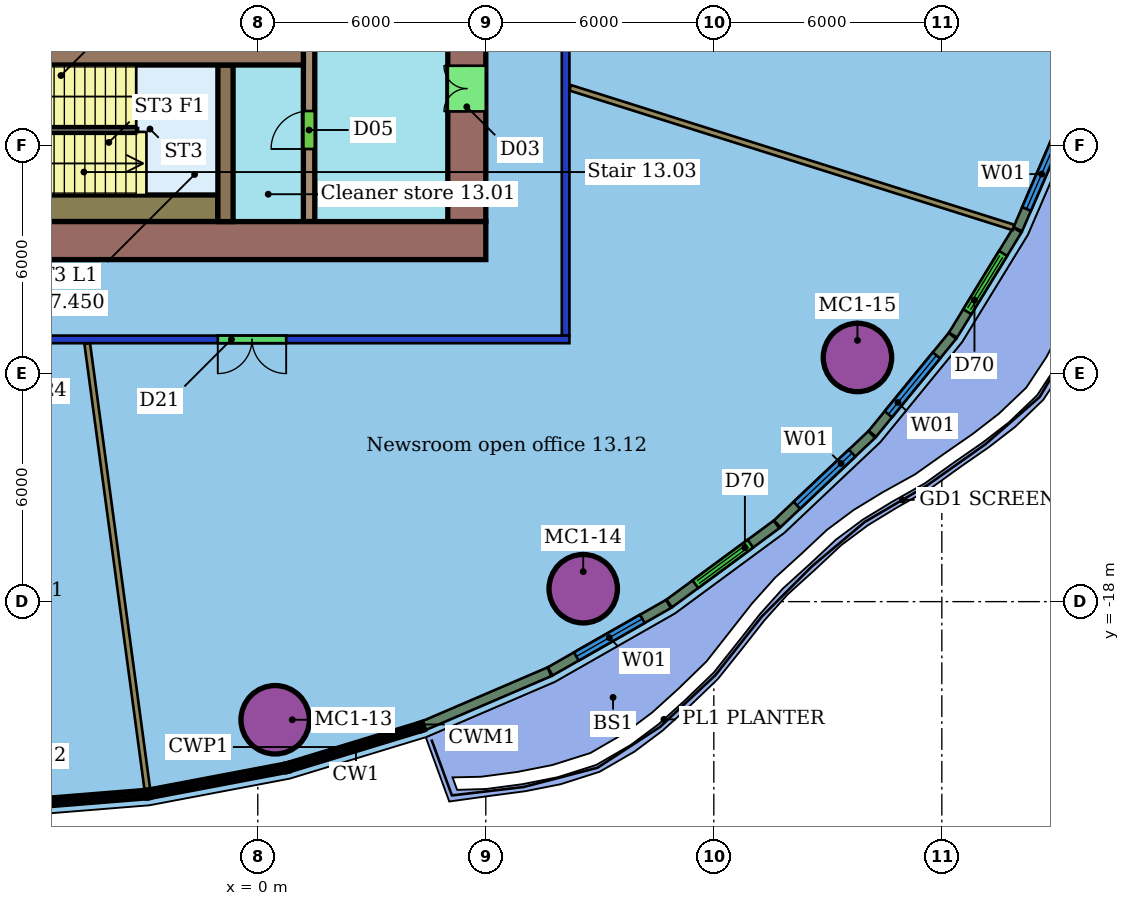
"""IFC4 building model, lengths in metres.
Left out: names, types, materials, properties, quantities, classifications, styles, units other than length and angle.
Written with IfcOpenShell. Run it as: python <this file> out.ifc"""

import sys

from ifc_helpers import new_model, si_unit, direction, frame, frame_2d, origin, origin_2d, place, context, subcontext, project, spatial, rectangle, hollow_circle, extrude, element, fill, save


model = new_model("IFC4")
c1 = context("Model", 3, precision=1e-05, world=origin(), true_north=direction((0.0, 1.0)))
c2 = subcontext(c1, "Body", "Model", "MODEL_VIEW")
j1 = project(units=[si_unit("LENGTHUNIT", "METRE"), si_unit("PLANEANGLEUNIT", "RADIAN")], contexts=[c1])
p1 = place(None, origin())
s1 = spatial("IfcSite", under=j1, at=p1, CompositionType="ELEMENT")
p2 = place(p1, origin())
s2 = spatial("IfcBuilding", under=s1, at=p2, CompositionType="ELEMENT")
p3 = place(p2, frame((0.0, 0.0, 65.6)))
s3 = spatial("IfcBuildingStorey", under=s2, at=p3, CompositionType="ELEMENT", Elevation=65.6)
for number, where, z_axis, x_axis in (
    (1, (0.458, -21.108, 0.0), (0.0, 0.0, 1.0), (1.0, 0.0, 0.0)),
    (2, (8.563, -17.66, 0.0), (0.0, 0.0, 1.0), (1.0, 0.0, 0.0)),
    (3, (15.78, -11.576, 0.0), (0.0, 0.0, 1.0), (1.0, 0.0, 0.0)),
):
    element("IfcColumn", number, at=place(p3, frame(where, z_axis=z_axis, x_axis=x_axis)), inside=s3, PredefinedType="COLUMN", context=c2, shape_type="SweptSolid", body=[
        extrude(hollow_circle(Radius=0.9, WallThickness=0.06, at=origin_2d()), origin(), (0.0, 0.0, 1.0), 3.55),
    ])
p4 = place(p3, frame((8.2, -11.1, 0.0), z_axis=(0.0, 0.0, 1.0), x_axis=(-1.0, 0.0, 0.0)))
e4 = element("IfcWall", 4, at=p4, inside=s3, PredefinedType="PARTITIONING", context=c2, shape_type="SweptSolid", body=[
    extrude(rectangle(XDim=28.4, YDim=0.2, at=frame_2d((14.2, 0.0))), origin(), (0.0, 0.0, 1.0), 2.85),
])
p5 = place(p4, frame((19.964, 0.0, 0.0)))
e5 = element("IfcOpeningElement", 5, at=p5, cuts=e4, PredefinedType="OPENING", context=c2, shape_type="SweptSolid", body=[
    extrude(rectangle(XDim=1.1, YDim=2.1, at=frame_2d((0.55, 1.05))), frame((0.0, 0.11, 0.0), z_axis=(0.0, -1.0, 0.0), x_axis=(1.0, 0.0, 0.0)), (0.0, 0.0, 1.0), 0.22),
])
p6 = place(p4, frame((15.239, 0.0, 0.0)))
e6 = element("IfcOpeningElement", 6, at=p6, cuts=e4, PredefinedType="OPENING", context=c2, shape_type="SweptSolid", body=[
    extrude(rectangle(XDim=1.5, YDim=2.1, at=frame_2d((0.75, 1.05))), frame((0.0, 0.11, 0.0), z_axis=(0.0, -1.0, 0.0), x_axis=(1.0, 0.0, 0.0)), (0.0, 0.0, 1.0), 0.22),
])
p7 = place(p4, frame((7.453, 0.0, 0.0)))
e7 = element("IfcOpeningElement", 7, at=p7, cuts=e4, PredefinedType="OPENING", context=c2, shape_type="SweptSolid", body=[
    extrude(rectangle(XDim=1.8, YDim=2.1, at=frame_2d((0.9, 1.05))), frame((0.0, 0.11, 0.0), z_axis=(0.0, -1.0, 0.0), x_axis=(1.0, 0.0, 0.0)), (0.0, 0.0, 1.0), 0.22),
])
p8 = place(p3, frame((8.1, 11.0, 0.0), z_axis=(0.0, 0.0, 1.0), x_axis=(0.0, -1.0, 0.0)))
e8 = element("IfcWall", 8, at=p8, inside=s3, PredefinedType="PARTITIONING", context=c2, shape_type="SweptSolid", body=[
    extrude(rectangle(XDim=22.0, YDim=0.2, at=frame_2d((11.0, 0.0))), origin(), (0.0, 0.0, 1.0), 2.85),
])
p9 = place(p8, frame((5.939, 0.0, 0.0)))
e9 = element("IfcOpeningElement", 9, at=p9, cuts=e8, PredefinedType="OPENING", context=c2, shape_type="SweptSolid", body=[
    extrude(rectangle(XDim=1.1, YDim=2.1, at=frame_2d((0.55, 1.05))), frame((0.0, 0.11, 0.0), z_axis=(0.0, -1.0, 0.0), x_axis=(1.0, 0.0, 0.0)), (0.0, 0.0, 1.0), 0.22),
])
p10 = place(p8, frame((12.727, 0.0, 0.0)))
e10 = element("IfcOpeningElement", 10, at=p10, cuts=e8, PredefinedType="OPENING", context=c2, shape_type="SweptSolid", body=[
    extrude(rectangle(XDim=0.9, YDim=2.1, at=frame_2d((0.45, 1.05))), frame((0.0, 0.11, 0.0), z_axis=(0.0, -1.0, 0.0), x_axis=(1.0, 0.0, 0.0)), (0.0, 0.0, 1.0), 0.22),
])
p11 = place(p3, frame((-2.907, -22.937, 0.0), z_axis=(0.0, 0.0, 1.0), x_axis=(-0.133632581672, 0.99103094458, 0.0)))
e11 = element("IfcWall", 11, at=p11, inside=s3, PredefinedType="PARTITIONING", context=c2, shape_type="SweptSolid", body=[
    extrude(rectangle(XDim=11.833, YDim=0.15, at=frame_2d((5.917, 0.0))), origin(), (0.0, 0.0, 1.0), 3.55),
])
p12 = place(p3, frame((19.884, -8.154, 0.0), z_axis=(0.0, 0.0, 1.0), x_axis=(-0.953792780191, 0.300465193417, 0.0)))
e12 = element("IfcWall", 12, at=p12, inside=s3, PredefinedType="PARTITIONING", context=c2, shape_type="SweptSolid", body=[
    extrude(rectangle(XDim=12.226, YDim=0.15, at=frame_2d((6.113, 0.0))), origin(), (0.0, 0.0, 1.0), 3.55),
])
p13 = place(p3, frame((4.368, -21.264, 0.0), z_axis=(0.0, 0.0, 1.0), x_axis=(0.918983536415, 0.394295903857, 0.0)))
e13 = element("IfcWall", 13, at=p13, inside=s3, PredefinedType="SOLIDWALL", context=c2, shape_type="SweptSolid", body=[
    extrude(rectangle(XDim=3.599, YDim=0.25, at=frame_2d((1.799, 0.0))), origin(), (0.0, 0.0, 1.0), 3.15),
])
p14 = place(p3, frame((7.695, -19.835, 0.0), z_axis=(0.0, 0.0, 1.0), x_axis=(0.868745900063, 0.495258075273, 0.0)))
e14 = element("IfcWall", 14, at=p14, inside=s3, PredefinedType="SOLIDWALL", context=c2, shape_type="SweptSolid", body=[
    extrude(rectangle(XDim=3.583, YDim=0.25, at=frame_2d((1.792, 0.0))), origin(), (0.0, 0.0, 1.0), 3.15),
])
p15 = place(p14, frame((0.791, 0.0, 0.8)))
e15 = element("IfcOpeningElement", 15, at=p15, cuts=e14, PredefinedType="OPENING", context=c2, shape_type="SweptSolid", body=[
    extrude(rectangle(XDim=2.0, YDim=2.2, at=frame_2d((1.0, 1.1))), frame((0.0, 0.135, 0.0), z_axis=(0.0, -1.0, 0.0), x_axis=(1.0, 0.0, 0.0)), (0.0, 0.0, 1.0), 0.27),
])
p16 = place(p3, frame((10.826, -18.049, 0.0), z_axis=(0.0, 0.0, 1.0), x_axis=(0.805090824586, 0.593151552444, 0.0)))
e16 = element("IfcWall", 16, at=p16, inside=s3, PredefinedType="SOLIDWALL", context=c2, shape_type="SweptSolid", body=[
    extrude(rectangle(XDim=3.508, YDim=0.25, at=frame_2d((1.754, 0.0))), origin(), (0.0, 0.0, 1.0), 3.15),
])
p17 = place(p16, frame((0.854, 0.0, 0.0)))
e17 = element("IfcOpeningElement", 17, at=p17, cuts=e16, PredefinedType="OPENING", context=c2, shape_type="SweptSolid", body=[
    extrude(rectangle(XDim=1.8, YDim=2.4, at=frame_2d((0.9, 1.2))), frame((0.0, 0.135, 0.0), z_axis=(0.0, -1.0, 0.0), x_axis=(1.0, 0.0, 0.0)), (0.0, 0.0, 1.0), 0.27),
])
p18 = place(p3, frame((13.668, -15.953, 0.0), z_axis=(0.0, 0.0, 1.0), x_axis=(0.726835063379, 0.686812048994, 0.0)))
e18 = element("IfcWall", 18, at=p18, inside=s3, PredefinedType="SOLIDWALL", context=c2, shape_type="SweptSolid", body=[
    extrude(rectangle(XDim=3.422, YDim=0.25, at=frame_2d((1.711, 0.0))), origin(), (0.0, 0.0, 1.0), 3.15),
])
p19 = place(p18, frame((0.711, 0.0, 0.8)))
e19 = element("IfcOpeningElement", 19, at=p19, cuts=e18, PredefinedType="OPENING", context=c2, shape_type="SweptSolid", body=[
    extrude(rectangle(XDim=2.0, YDim=2.2, at=frame_2d((1.0, 1.1))), frame((0.0, 0.135, 0.0), z_axis=(0.0, -1.0, 0.0), x_axis=(1.0, 0.0, 0.0)), (0.0, 0.0, 1.0), 0.27),
])
p20 = place(p3, frame((16.172, -13.585, 0.0), z_axis=(0.0, 0.0, 1.0), x_axis=(0.632874527105, 0.774254372246, 0.0)))
e20 = element("IfcWall", 20, at=p20, inside=s3, PredefinedType="SOLIDWALL", context=c2, shape_type="SweptSolid", body=[
    extrude(rectangle(XDim=3.331, YDim=0.25, at=frame_2d((1.666, 0.0))), origin(), (0.0, 0.0, 1.0), 3.15),
])
p21 = place(p20, frame((0.666, 0.0, 0.8)))
e21 = element("IfcOpeningElement", 21, at=p21, cuts=e20, PredefinedType="OPENING", context=c2, shape_type="SweptSolid", body=[
    extrude(rectangle(XDim=2.0, YDim=2.2, at=frame_2d((1.0, 1.1))), frame((0.0, 0.135, 0.0), z_axis=(0.0, -1.0, 0.0), x_axis=(1.0, 0.0, 0.0)), (0.0, 0.0, 1.0), 0.27),
])
p22 = place(p3, frame((18.294, -10.985, 0.0), z_axis=(0.0, 0.0, 1.0), x_axis=(0.522692781457, 0.852521117752, 0.0)))
e22 = element("IfcWall", 22, at=p22, inside=s3, PredefinedType="SOLIDWALL", context=c2, shape_type="SweptSolid", body=[
    extrude(rectangle(XDim=3.241, YDim=0.25, at=frame_2d((1.62, 0.0))), origin(), (0.0, 0.0, 1.0), 3.15),
])
p23 = place(p22, frame((0.72, 0.0, 0.0)))
e23 = element("IfcOpeningElement", 23, at=p23, cuts=e22, PredefinedType="OPENING", context=c2, shape_type="SweptSolid", body=[
    extrude(rectangle(XDim=1.8, YDim=2.4, at=frame_2d((0.9, 1.2))), frame((0.0, 0.135, 0.0), z_axis=(0.0, -1.0, 0.0), x_axis=(1.0, 0.0, 0.0)), (0.0, 0.0, 1.0), 0.27),
])
p24 = place(p3, frame((20.0, -8.2, 0.0), z_axis=(0.0, 0.0, 1.0), x_axis=(0.396530812493, 0.918021413009, 0.0)))
e24 = element("IfcWall", 24, at=p24, inside=s3, PredefinedType="SOLIDWALL", context=c2, shape_type="SweptSolid", body=[
    extrude(rectangle(XDim=3.157, YDim=0.25, at=frame_2d((1.579, 0.0))), origin(), (0.0, 0.0, 1.0), 3.15),
])
p25 = place(p24, frame((0.579, 0.0, 0.8)))
e25 = element("IfcOpeningElement", 25, at=p25, cuts=e24, PredefinedType="OPENING", context=c2, shape_type="SweptSolid", body=[
    extrude(rectangle(XDim=2.0, YDim=2.2, at=frame_2d((1.0, 1.1))), frame((0.0, 0.135, 0.0), z_axis=(0.0, -1.0, 0.0), x_axis=(1.0, 0.0, 0.0)), (0.0, 0.0, 1.0), 0.27),
])
p26 = place(p3, frame((-18.0, -8.5, 0.0), z_axis=(0.0, 0.0, 1.0), x_axis=(1.0, 0.0, 0.0)))
e26 = element("IfcWall", 26, at=p26, inside=s3, PredefinedType="SHEAR", context=c2, shape_type="SweptSolid", body=[
    extrude(rectangle(XDim=24.0, YDim=1.0, at=frame_2d((12.0, 0.0))), origin(), (0.0, 0.0, 1.0), 3.4),
])
p27 = place(p26, frame((6.0, 0.0, 0.0)))
e27 = element("IfcOpeningElement", 27, at=p27, cuts=e26, PredefinedType="OPENING", context=c2, shape_type="SweptSolid", body=[
    extrude(rectangle(XDim=1.2, YDim=2.1, at=frame_2d((0.6, 1.05))), frame((0.0, 0.51, 0.0), z_axis=(0.0, -1.0, 0.0), x_axis=(1.0, 0.0, 0.0)), (0.0, 0.0, 1.0), 1.02),
])
p28 = place(p3, frame((5.5, -8.0, 0.0), z_axis=(0.0, 0.0, 1.0), x_axis=(0.0, 1.0, 0.0)))
e28 = element("IfcWall", 28, at=p28, inside=s3, PredefinedType="SHEAR", context=c2, shape_type="SweptSolid", body=[
    extrude(rectangle(XDim=16.0, YDim=1.0, at=frame_2d((8.0, 0.0))), origin(), (0.0, 0.0, 1.0), 3.4),
])
p29 = place(p28, frame((2.9, 0.0, 0.0)))
e29 = element("IfcOpeningElement", 29, at=p29, cuts=e28, PredefinedType="OPENING", context=c2, shape_type="SweptSolid", body=[
    extrude(rectangle(XDim=1.2, YDim=2.1, at=frame_2d((0.6, 1.05))), frame((0.0, 0.51, 0.0), z_axis=(0.0, -1.0, 0.0), x_axis=(1.0, 0.0, 0.0)), (0.0, 0.0, 1.0), 1.02),
])
p30 = place(p28, frame((11.9, 0.0, 0.0)))
e30 = element("IfcOpeningElement", 30, at=p30, cuts=e28, PredefinedType="OPENING", context=c2, shape_type="SweptSolid", body=[
    extrude(rectangle(XDim=1.2, YDim=2.1, at=frame_2d((0.6, 1.05))), frame((0.0, 0.51, 0.0), z_axis=(0.0, -1.0, 0.0), x_axis=(1.0, 0.0, 0.0)), (0.0, 0.0, 1.0), 1.02),
])
p31 = place(p3, frame((-6.0, -3.58, 0.0), z_axis=(0.0, 0.0, 1.0), x_axis=(1.0, 0.0, 0.0)))
e31 = element("IfcWall", 31, at=p31, inside=s3, PredefinedType="SHEAR", context=c2, shape_type="SweptSolid", body=[
    extrude(rectangle(XDim=7.2, YDim=0.6, at=frame_2d((3.6, 0.0))), origin(), (0.0, 0.0, 1.0), 3.4),
])
p32 = place(p3, frame((1.35, -8.0, 0.0), z_axis=(0.0, 0.0, 1.0), x_axis=(0.0, 1.0, 0.0)))
e32 = element("IfcWall", 32, at=p32, inside=s3, PredefinedType="SHEAR", context=c2, shape_type="SweptSolid", body=[
    extrude(rectangle(XDim=16.0, YDim=0.3, at=frame_2d((8.0, 0.0))), origin(), (0.0, 0.0, 1.0), 3.4),
])
p33 = place(p32, frame((1.91, 0.0, 0.0)))
e33 = element("IfcOpeningElement", 33, at=p33, cuts=e32, PredefinedType="OPENING", context=c2, shape_type="SweptSolid", body=[
    extrude(rectangle(XDim=1.0, YDim=2.1, at=frame_2d((0.5, 1.05))), frame((0.0, 0.16, 0.0), z_axis=(0.0, -1.0, 0.0), x_axis=(1.0, 0.0, 0.0)), (0.0, 0.0, 1.0), 0.32),
])
p34 = place(p32, frame((7.25, 0.0, 0.0)))
e34 = element("IfcOpeningElement", 34, at=p34, cuts=e32, PredefinedType="OPENING", context=c2, shape_type="SweptSolid", body=[
    extrude(rectangle(XDim=1.5, YDim=2.1, at=frame_2d((0.75, 1.05))), frame((0.0, 0.16, 0.0), z_axis=(0.0, -1.0, 0.0), x_axis=(1.0, 0.0, 0.0)), (0.0, 0.0, 1.0), 0.32),
])
p35 = place(p3, frame((-0.85, -3.88, 0.0), z_axis=(0.0, 0.0, 1.0), x_axis=(0.0, -1.0, 0.0)))
e35 = element("IfcWall", 35, at=p35, inside=s3, PredefinedType="SHEAR", context=c2, shape_type="SweptSolid", body=[
    extrude(rectangle(XDim=4.12, YDim=0.4, at=frame_2d((2.06, 0.0))), origin(), (0.0, 0.0, 1.0), 3.4),
])
p36 = place(p3, frame((-8.1, -7.65, 0.0), z_axis=(0.0, 0.0, 1.0), x_axis=(1.0, 0.0, 0.0)))
e36 = element("IfcWall", 36, at=p36, inside=s3, PredefinedType="SHEAR", context=c2, shape_type="SweptSolid", body=[
    extrude(rectangle(XDim=7.05, YDim=0.7, at=frame_2d((3.525, 0.0))), origin(), (0.0, 0.0, 1.0), 3.4),
])
p37 = place(p7, origin())
e37 = element("IfcDoor", 37, at=p37, inside=s3, OperationType="DOUBLE_DOOR_SINGLE_SWING", PredefinedType="DOOR", context=c2, shape_type="SweptSolid", body=[
    extrude(rectangle(XDim=1.8, YDim=2.1, at=frame_2d((0.9, 1.05))), frame((0.0, 0.025, 0.0), z_axis=(0.0, -1.0, 0.0), x_axis=(1.0, 0.0, 0.0)), (0.0, 0.0, 1.0), 0.05),
])
fill(e7, e37)
p38 = place(p15, origin())
e38 = element("IfcWindow", 38, at=p38, inside=s3, PartitioningType="SINGLE_PANEL", PredefinedType="WINDOW", context=c2, shape_type="SweptSolid", body=[
    extrude(rectangle(XDim=2.0, YDim=2.2, at=frame_2d((1.0, 1.1))), frame((0.0, 0.03, 0.0), z_axis=(0.0, -1.0, 0.0), x_axis=(1.0, 0.0, 0.0)), (0.0, 0.0, 1.0), 0.06),
])
fill(e15, e38)
p39 = place(p17, origin())
e39 = element("IfcDoor", 39, at=p39, inside=s3, OperationType="DOUBLE_DOOR_SLIDING", PredefinedType="DOOR", context=c2, shape_type="SweptSolid", body=[
    extrude(rectangle(XDim=1.8, YDim=2.4, at=frame_2d((0.9, 1.2))), frame((0.0, 0.025, 0.0), z_axis=(0.0, -1.0, 0.0), x_axis=(1.0, 0.0, 0.0)), (0.0, 0.0, 1.0), 0.05),
])
fill(e17, e39)
p40 = place(p19, origin())
e40 = element("IfcWindow", 40, at=p40, inside=s3, PartitioningType="SINGLE_PANEL", PredefinedType="WINDOW", context=c2, shape_type="SweptSolid", body=[
    extrude(rectangle(XDim=2.0, YDim=2.2, at=frame_2d((1.0, 1.1))), frame((0.0, 0.03, 0.0), z_axis=(0.0, -1.0, 0.0), x_axis=(1.0, 0.0, 0.0)), (0.0, 0.0, 1.0), 0.06),
])
fill(e19, e40)
p41 = place(p21, origin())
e41 = element("IfcWindow", 41, at=p41, inside=s3, PartitioningType="SINGLE_PANEL", PredefinedType="WINDOW", context=c2, shape_type="SweptSolid", body=[
    extrude(rectangle(XDim=2.0, YDim=2.2, at=frame_2d((1.0, 1.1))), frame((0.0, 0.03, 0.0), z_axis=(0.0, -1.0, 0.0), x_axis=(1.0, 0.0, 0.0)), (0.0, 0.0, 1.0), 0.06),
])
fill(e21, e41)
p42 = place(p23, origin())
e42 = element("IfcDoor", 42, at=p42, inside=s3, OperationType="DOUBLE_DOOR_SLIDING", PredefinedType="DOOR", context=c2, shape_type="SweptSolid", body=[
    extrude(rectangle(XDim=1.8, YDim=2.4, at=frame_2d((0.9, 1.2))), frame((0.0, 0.025, 0.0), z_axis=(0.0, -1.0, 0.0), x_axis=(1.0, 0.0, 0.0)), (0.0, 0.0, 1.0), 0.05),
])
fill(e23, e42)
p43 = place(p25, origin())
e43 = element("IfcWindow", 43, at=p43, inside=s3, PartitioningType="SINGLE_PANEL", PredefinedType="WINDOW", context=c2, shape_type="SweptSolid", body=[
    extrude(rectangle(XDim=2.0, YDim=2.2, at=frame_2d((1.0, 1.1))), frame((0.0, 0.03, 0.0), z_axis=(0.0, -1.0, 0.0), x_axis=(1.0, 0.0, 0.0)), (0.0, 0.0, 1.0), 0.06),
])
fill(e25, e43)
p44 = place(p29, origin())
e44 = element("IfcDoor", 44, at=p44, inside=s3, OperationType="DOUBLE_DOOR_SINGLE_SWING", PredefinedType="NOTDEFINED", context=c2, shape_type="SweptSolid", body=[
    extrude(rectangle(XDim=1.2, YDim=2.1, at=frame_2d((0.6, 1.05))), frame((0.0, 0.025, 0.0), z_axis=(0.0, -1.0, 0.0), x_axis=(1.0, 0.0, 0.0)), (0.0, 0.0, 1.0), 0.05),
])
fill(e29, e44)
p45 = place(p33, origin())
e45 = element("IfcDoor", 45, at=p45, inside=s3, OperationType="SINGLE_SWING_LEFT", PredefinedType="NOTDEFINED", context=c2, shape_type="SweptSolid", body=[
    extrude(rectangle(XDim=1.0, YDim=2.1, at=frame_2d((0.5, 1.05))), frame((0.0, 0.025, 0.0), z_axis=(0.0, -1.0, 0.0), x_axis=(1.0, 0.0, 0.0)), (0.0, 0.0, 1.0), 0.05),
])
fill(e33, e45)
save(model, sys.argv[1])
